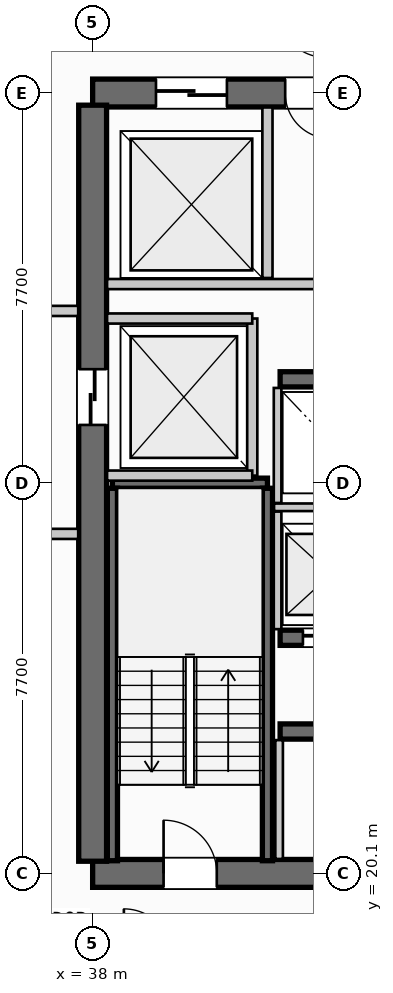
"""IFC4 building model, lengths in metres.
Left out: names, types, materials, properties, quantities, classifications, styles, units other than length and angle.
Written with IfcOpenShell. Run it as: python <this file> out.ifc"""

import sys

from ifc_helpers import new_model, si_unit, direction, frame, frame_2d, origin, place, context, subcontext, project, spatial, rectangle, extrude, source, transform, mapped, element, fill, save


model = new_model("IFC4")
c1 = context("Model", 3, precision=1e-05, world=origin(), true_north=direction((0.0, 1.0)))
c2 = subcontext(c1, "Body", "Model", "MODEL_VIEW")
j1 = project(units=[si_unit("LENGTHUNIT", "METRE"), si_unit("PLANEANGLEUNIT", "RADIAN")], contexts=[c1])
p1 = place(None, origin())
s1 = spatial("IfcSite", under=j1, at=p1, CompositionType="ELEMENT")
p2 = place(p1, origin())
s2 = spatial("IfcBuilding", under=s1, at=p2, CompositionType="ELEMENT")
p3 = place(p2, frame((0.0, 0.0, 150.1)))
s3 = spatial("IfcBuildingStorey", under=s2, at=p3, CompositionType="ELEMENT", Elevation=150.1)
p4 = place(p3, frame((38.0, 20.1, 0.0), z_axis=(0.0, 0.0, 1.0), x_axis=(1.0, 0.0, 0.0)))
e1 = element("IfcWall", 1, at=p4, inside=s3, PredefinedType="SHEAR", context=c2, shape_type="SweptSolid", body=[
    extrude(rectangle(XDim=17.6, YDim=0.55, at=frame_2d((8.8, 0.0))), origin(), (0.0, 0.0, 1.0), 3.3),
])
p5 = place(p4, frame((1.4, 0.0, 0.0)))
e2 = element("IfcOpeningElement", 2, at=p5, cuts=e1, PredefinedType="OPENING", context=c2, shape_type="SweptSolid", body=[
    extrude(rectangle(XDim=1.05, YDim=2.15, at=frame_2d((0.525, 1.075))), frame((0.0, 0.285, 0.0), z_axis=(0.0, -1.0, 0.0), x_axis=(1.0, 0.0, 0.0)), (0.0, 0.0, 1.0), 0.57),
])
p6 = place(p4, frame((15.15, 0.0, 0.0)))
e3 = element("IfcOpeningElement", 3, at=p6, cuts=e1, PredefinedType="OPENING", context=c2, shape_type="SweptSolid", body=[
    extrude(rectangle(XDim=1.05, YDim=2.15, at=frame_2d((0.525, 1.075))), frame((0.0, 0.285, 0.0), z_axis=(0.0, -1.0, 0.0), x_axis=(1.0, 0.0, 0.0)), (0.0, 0.0, 1.0), 0.57),
])
p7 = place(p4, frame((5.25, 0.0, 0.0)))
e4 = element("IfcOpeningElement", 4, at=p7, cuts=e1, PredefinedType="OPENING", context=c2, shape_type="SweptSolid", body=[
    extrude(rectangle(XDim=0.9, YDim=2.15, at=frame_2d((0.45, 1.075))), frame((0.0, 0.285, 0.0), z_axis=(0.0, -1.0, 0.0), x_axis=(1.0, 0.0, 0.0)), (0.0, 0.0, 1.0), 0.57),
])
p8 = place(p4, frame((11.4, 0.0, 0.0)))
e5 = element("IfcOpeningElement", 5, at=p8, cuts=e1, PredefinedType="OPENING", context=c2, shape_type="SweptSolid", body=[
    extrude(rectangle(XDim=0.95, YDim=2.15, at=frame_2d((0.475, 1.075))), frame((0.0, 0.285, 0.0), z_axis=(0.0, -1.0, 0.0), x_axis=(1.0, 0.0, 0.0)), (0.0, 0.0, 1.0), 0.57),
])
p9 = place(p3, frame((55.6, 35.5, 0.0), z_axis=(0.0, 0.0, 1.0), x_axis=(-1.0, 0.0, 0.0)))
e6 = element("IfcWall", 6, at=p9, inside=s3, PredefinedType="SHEAR", context=c2, shape_type="SweptSolid", body=[
    extrude(rectangle(XDim=17.6, YDim=0.55, at=frame_2d((8.8, 0.0))), origin(), (0.0, 0.0, 1.0), 3.3),
])
p10 = place(p9, frame((8.05, 0.0, 0.0)))
e7 = element("IfcOpeningElement", 7, at=p10, cuts=e6, PredefinedType="OPENING", context=c2, shape_type="SweptSolid", body=[
    extrude(rectangle(XDim=1.5, YDim=2.2, at=frame_2d((0.75, 1.1))), frame((0.0, 0.285, 0.0), z_axis=(0.0, -1.0, 0.0), x_axis=(1.0, 0.0, 0.0)), (0.0, 0.0, 1.0), 0.57),
])
p11 = place(p9, frame((14.95, 0.0, 0.0)))
e8 = element("IfcOpeningElement", 8, at=p11, cuts=e6, PredefinedType="OPENING", context=c2, shape_type="SweptSolid", body=[
    extrude(rectangle(XDim=1.4, YDim=2.3, at=frame_2d((0.7, 1.15))), frame((0.0, 0.285, 0.0), z_axis=(0.0, -1.0, 0.0), x_axis=(1.0, 0.0, 0.0)), (0.0, 0.0, 1.0), 0.57),
])
p12 = place(p9, frame((12.9, 0.0, 0.0)))
e9 = element("IfcOpeningElement", 9, at=p12, cuts=e6, PredefinedType="OPENING", context=c2, shape_type="SweptSolid", body=[
    extrude(rectangle(XDim=0.9, YDim=2.15, at=frame_2d((0.45, 1.075))), frame((0.0, 0.285, 0.0), z_axis=(0.0, -1.0, 0.0), x_axis=(1.0, 0.0, 0.0)), (0.0, 0.0, 1.0), 0.57),
])
p13 = place(p9, frame((10.6, 0.0, 0.0)))
e10 = element("IfcOpeningElement", 10, at=p13, cuts=e6, PredefinedType="OPENING", context=c2, shape_type="SweptSolid", body=[
    extrude(rectangle(XDim=0.95, YDim=2.15, at=frame_2d((0.475, 1.075))), frame((0.0, 0.285, 0.0), z_axis=(0.0, -1.0, 0.0), x_axis=(1.0, 0.0, 0.0)), (0.0, 0.0, 1.0), 0.57),
])
p14 = place(p3, frame((38.0, 35.26, 0.0), z_axis=(0.0, 0.0, 1.0), x_axis=(0.0, -1.0, 0.0)))
e11 = element("IfcWall", 11, at=p14, inside=s3, PredefinedType="SHEAR", context=c2, shape_type="SweptSolid", body=[
    extrude(rectangle(XDim=14.92, YDim=0.55, at=frame_2d((7.46, 0.0))), origin(), (0.0, 0.0, 1.0), 3.3),
])
p15 = place(p14, frame((5.21, 0.0, 0.0)))
e12 = element("IfcOpeningElement", 12, at=p15, cuts=e11, PredefinedType="OPENING", context=c2, shape_type="SweptSolid", body=[
    extrude(rectangle(XDim=1.1, YDim=2.2, at=frame_2d((0.55, 1.1))), frame((0.0, 0.285, 0.0), z_axis=(0.0, -1.0, 0.0), x_axis=(1.0, 0.0, 0.0)), (0.0, 0.0, 1.0), 0.57),
])
p16 = place(p3, frame((41.7, 22.9, 0.0), z_axis=(0.0, 0.0, 1.0), x_axis=(1.0, 0.0, 0.0)))
e13 = element("IfcWall", 13, at=p16, inside=s3, PredefinedType="SHEAR", context=c2, shape_type="SweptSolid", body=[
    extrude(rectangle(XDim=4.25, YDim=0.3, at=frame_2d((2.125, 0.0))), origin(), (0.0, 0.0, 1.0), 3.3),
])
p17 = place(p3, frame((41.7, 24.75, 0.0), z_axis=(0.0, 0.0, 1.0), x_axis=(1.0, 0.0, 0.0)))
e14 = element("IfcWall", 14, at=p17, inside=s3, PredefinedType="SHEAR", context=c2, shape_type="SweptSolid", body=[
    extrude(rectangle(XDim=4.25, YDim=0.3, at=frame_2d((2.125, 0.0))), origin(), (0.0, 0.0, 1.0), 3.3),
])
p18 = place(p17, frame((0.45, 0.0, 0.0)))
e15 = element("IfcOpeningElement", 15, at=p18, cuts=e14, PredefinedType="OPENING", context=c2, shape_type="SweptSolid", body=[
    extrude(rectangle(XDim=1.1, YDim=2.2, at=frame_2d((0.55, 1.1))), frame((0.0, 0.16, 0.0), z_axis=(0.0, -1.0, 0.0), x_axis=(1.0, 0.0, 0.0)), (0.0, 0.0, 1.0), 0.32),
])
p19 = place(p17, frame((2.5, 0.0, 0.0)))
e16 = element("IfcOpeningElement", 16, at=p19, cuts=e14, PredefinedType="OPENING", context=c2, shape_type="SweptSolid", body=[
    extrude(rectangle(XDim=1.1, YDim=2.2, at=frame_2d((0.55, 1.1))), frame((0.0, 0.16, 0.0), z_axis=(0.0, -1.0, 0.0), x_axis=(1.0, 0.0, 0.0)), (0.0, 0.0, 1.0), 0.32),
])
p20 = place(p3, frame((41.7, 29.85, 0.0), z_axis=(0.0, 0.0, 1.0), x_axis=(1.0, 0.0, 0.0)))
e17 = element("IfcWall", 17, at=p20, inside=s3, PredefinedType="SHEAR", context=c2, shape_type="SweptSolid", body=[
    extrude(rectangle(XDim=4.25, YDim=0.3, at=frame_2d((2.125, 0.0))), origin(), (0.0, 0.0, 1.0), 3.3),
])
p21 = place(p3, frame((38.39, 27.8, 0.0), z_axis=(0.0, 0.0, 1.0), x_axis=(1.0, 0.0, 0.0)))
e18 = element("IfcWall", 18, at=p21, inside=s3, PredefinedType="SHEAR", context=c2, shape_type="SweptSolid", body=[
    extrude(rectangle(XDim=3.06, YDim=0.2, at=frame_2d((1.53, 0.0))), origin(), (0.0, 0.0, 1.0), 3.3),
])
for number, where, z_axis, x_axis in (
    (19, (41.45, 27.7, 0.0), (0.0, 0.0, 1.0), (0.0, -1.0, 0.0)),
    (20, (38.39, 20.35, 0.0), (0.0, 0.0, 1.0), (0.0, 1.0, 0.0)),
):
    element("IfcWall", number, at=place(p3, frame(where, z_axis=z_axis, x_axis=x_axis)), inside=s3, PredefinedType="SHEAR", context=c2, shape_type="SweptSolid", body=[
        extrude(rectangle(XDim=7.35, YDim=0.2, at=frame_2d((3.675, 0.0))), origin(), (0.0, 0.0, 1.0), 3.3),
    ])
p22 = place(p3, frame((41.15, 27.95, 0.0), z_axis=(0.0, 0.0, 1.0), x_axis=(0.0, 1.0, 0.0)))
e21 = element("IfcWall", 21, at=p22, inside=s3, PredefinedType="PARTITIONING", context=c2, shape_type="SweptSolid", body=[
    extrude(rectangle(XDim=3.1, YDim=0.2, at=frame_2d((1.55, 0.0))), origin(), (0.0, 0.0, 1.0), 2.28),
])
for number, where, z_axis, x_axis in (
    (22, (38.285, 27.95, 0.0), (0.0, 0.0, 1.0), (1.0, 0.0, 0.0)),
    (23, (38.285, 31.05, 0.0), (0.0, 0.0, 1.0), (1.0, 0.0, 0.0)),
):
    element("IfcWall", number, at=place(p3, frame(where, z_axis=z_axis, x_axis=x_axis)), inside=s3, PredefinedType="PARTITIONING", context=c2, shape_type="SweptSolid", body=[
        extrude(rectangle(XDim=2.865, YDim=0.2, at=frame_2d((1.433, 0.0))), origin(), (0.0, 0.0, 1.0), 2.28),
    ])
for number, where, z_axis, x_axis in (
    (24, (34.5, 26.8, 0.0), (0.0, 0.0, 1.0), (1.0, 0.0, 0.0)),
    (25, (34.5, 31.2, 0.0), (0.0, 0.0, 1.0), (1.0, 0.0, 0.0)),
):
    element("IfcWall", number, at=place(p3, frame(where, z_axis=z_axis, x_axis=x_axis)), inside=s3, PredefinedType="PARTITIONING", context=c2, shape_type="SweptSolid", body=[
        extrude(rectangle(XDim=3.215, YDim=0.2, at=frame_2d((1.607, 0.0))), origin(), (0.0, 0.0, 1.0), 2.28),
    ])
p23 = place(p3, frame((41.68, 20.385, 0.0), z_axis=(0.0, 0.0, 1.0), x_axis=(0.0, 1.0, 0.0)))
e26 = element("IfcWall", 26, at=p23, inside=s3, PredefinedType="PARTITIONING", context=c2, shape_type="SweptSolid", body=[
    extrude(rectangle(XDim=2.345, YDim=0.15, at=frame_2d((1.172, 0.0))), origin(), (0.0, 0.0, 1.0), 2.28),
])
p24 = place(p3, frame((41.58, 27.325, 0.0), z_axis=(0.0, 0.0, 1.0), x_axis=(1.0, 0.0, 0.0)))
e27 = element("IfcWall", 27, at=p24, inside=s3, PredefinedType="PARTITIONING", context=c2, shape_type="SweptSolid", body=[
    extrude(rectangle(XDim=4.32, YDim=0.15, at=frame_2d((2.16, 0.0))), origin(), (0.0, 0.0, 1.0), 2.28),
])
p25 = place(p3, frame((41.65, 24.92, 0.0), z_axis=(0.0, 0.0, 1.0), x_axis=(0.0, 1.0, 0.0)))
e28 = element("IfcWall", 28, at=p25, inside=s3, PredefinedType="PARTITIONING", context=c2, shape_type="SweptSolid", body=[
    extrude(rectangle(XDim=2.32, YDim=0.15, at=frame_2d((1.16, 0.0))), origin(), (0.0, 0.0, 1.0), 2.28),
])
p26 = place(p3, frame((41.65, 27.41, 0.0), z_axis=(0.0, 0.0, 1.0), x_axis=(0.0, 1.0, 0.0)))
e29 = element("IfcWall", 29, at=p26, inside=s3, PredefinedType="PARTITIONING", context=c2, shape_type="SweptSolid", body=[
    extrude(rectangle(XDim=2.27, YDim=0.15, at=frame_2d((1.135, 0.0))), origin(), (0.0, 0.0, 1.0), 2.28),
])
p27 = place(p3, frame((41.45, 31.85, 0.0), z_axis=(0.0, 0.0, 1.0), x_axis=(0.0, 1.0, 0.0)))
e30 = element("IfcWall", 30, at=p27, inside=s3, PredefinedType="PARTITIONING", context=c2, shape_type="SweptSolid", body=[
    extrude(rectangle(XDim=3.365, YDim=0.2, at=frame_2d((1.683, 0.0))), origin(), (0.0, 0.0, 1.0), 2.28),
])
p28 = place(p3, frame((38.285, 31.73, 0.0), z_axis=(0.0, 0.0, 1.0), x_axis=(1.0, 0.0, 0.0)))
e31 = element("IfcWall", 31, at=p28, inside=s3, PredefinedType="PARTITIONING", context=c2, shape_type="SweptSolid", body=[
    extrude(rectangle(XDim=7.515, YDim=0.2, at=frame_2d((3.758, 0.0))), origin(), (0.0, 0.0, 1.0), 2.28),
])
m1 = source(origin(), c2, "Body", "SweptSolid", [
    extrude(rectangle(XDim=1.05, YDim=2.15, at=frame_2d((0.525, 1.075))), frame((0.0, 0.025, 0.0), z_axis=(0.0, -1.0, 0.0), x_axis=(1.0, 0.0, 0.0)), (0.0, 0.0, 1.0), 0.05),
])
p29 = place(p5, origin())
e32 = element("IfcDoor", 32, at=p29, inside=s3, OperationType="SINGLE_SWING_LEFT", PredefinedType="DOOR", context=c2, shape_type="MappedRepresentation", body=[
    mapped(m1, transform((0.0, 0.0, 0.0), scale=1.0)),
])
fill(e2, e32)
m2 = source(origin(), c2, "Body", "SweptSolid", [
    extrude(rectangle(XDim=1.1, YDim=2.2, at=frame_2d((0.55, 1.1))), frame((0.0, 0.025, 0.0), z_axis=(0.0, -1.0, 0.0), x_axis=(1.0, 0.0, 0.0)), (0.0, 0.0, 1.0), 0.05),
])
p30 = place(p15, origin())
e33 = element("IfcDoor", 33, at=p30, inside=s3, OperationType="SLIDING_TO_LEFT", PredefinedType="DOOR", context=c2, shape_type="MappedRepresentation", body=[
    mapped(m2, transform((0.0, 0.0, 0.0), scale=1.0)),
])
fill(e12, e33)
p31 = place(p18, origin())
e34 = element("IfcDoor", 34, at=p31, inside=s3, OperationType="SLIDING_TO_RIGHT", PredefinedType="DOOR", context=c2, shape_type="MappedRepresentation", body=[
    mapped(m2, transform((0.0, 0.0, 0.0), scale=1.0)),
])
fill(e15, e34)
m3 = source(origin(), c2, "Body", "SweptSolid", [
    extrude(rectangle(XDim=1.4, YDim=2.3, at=frame_2d((0.7, 1.15))), frame((0.0, 0.025, 0.0), z_axis=(0.0, -1.0, 0.0), x_axis=(1.0, 0.0, 0.0)), (0.0, 0.0, 1.0), 0.05),
])
p32 = place(p11, origin())
e35 = element("IfcDoor", 35, at=p32, inside=s3, OperationType="SLIDING_TO_RIGHT", PredefinedType="DOOR", context=c2, shape_type="MappedRepresentation", body=[
    mapped(m3, transform((0.0, 0.0, 0.0), scale=1.0)),
])
fill(e8, e35)
m4 = source(origin(), c2, "Body", "SweptSolid", [
    extrude(rectangle(XDim=0.9, YDim=2.15, at=frame_2d((0.45, 1.075))), frame((0.0, 0.025, 0.0), z_axis=(0.0, -1.0, 0.0), x_axis=(1.0, 0.0, 0.0)), (0.0, 0.0, 1.0), 0.05),
])
p33 = place(p12, origin())
e36 = element("IfcDoor", 36, at=p33, inside=s3, OperationType="SINGLE_SWING_LEFT", PredefinedType="DOOR", context=c2, shape_type="MappedRepresentation", body=[
    mapped(m4, transform((0.0, 0.0, 0.0), scale=1.0)),
])
fill(e9, e36)
save(model, sys.argv[1])
